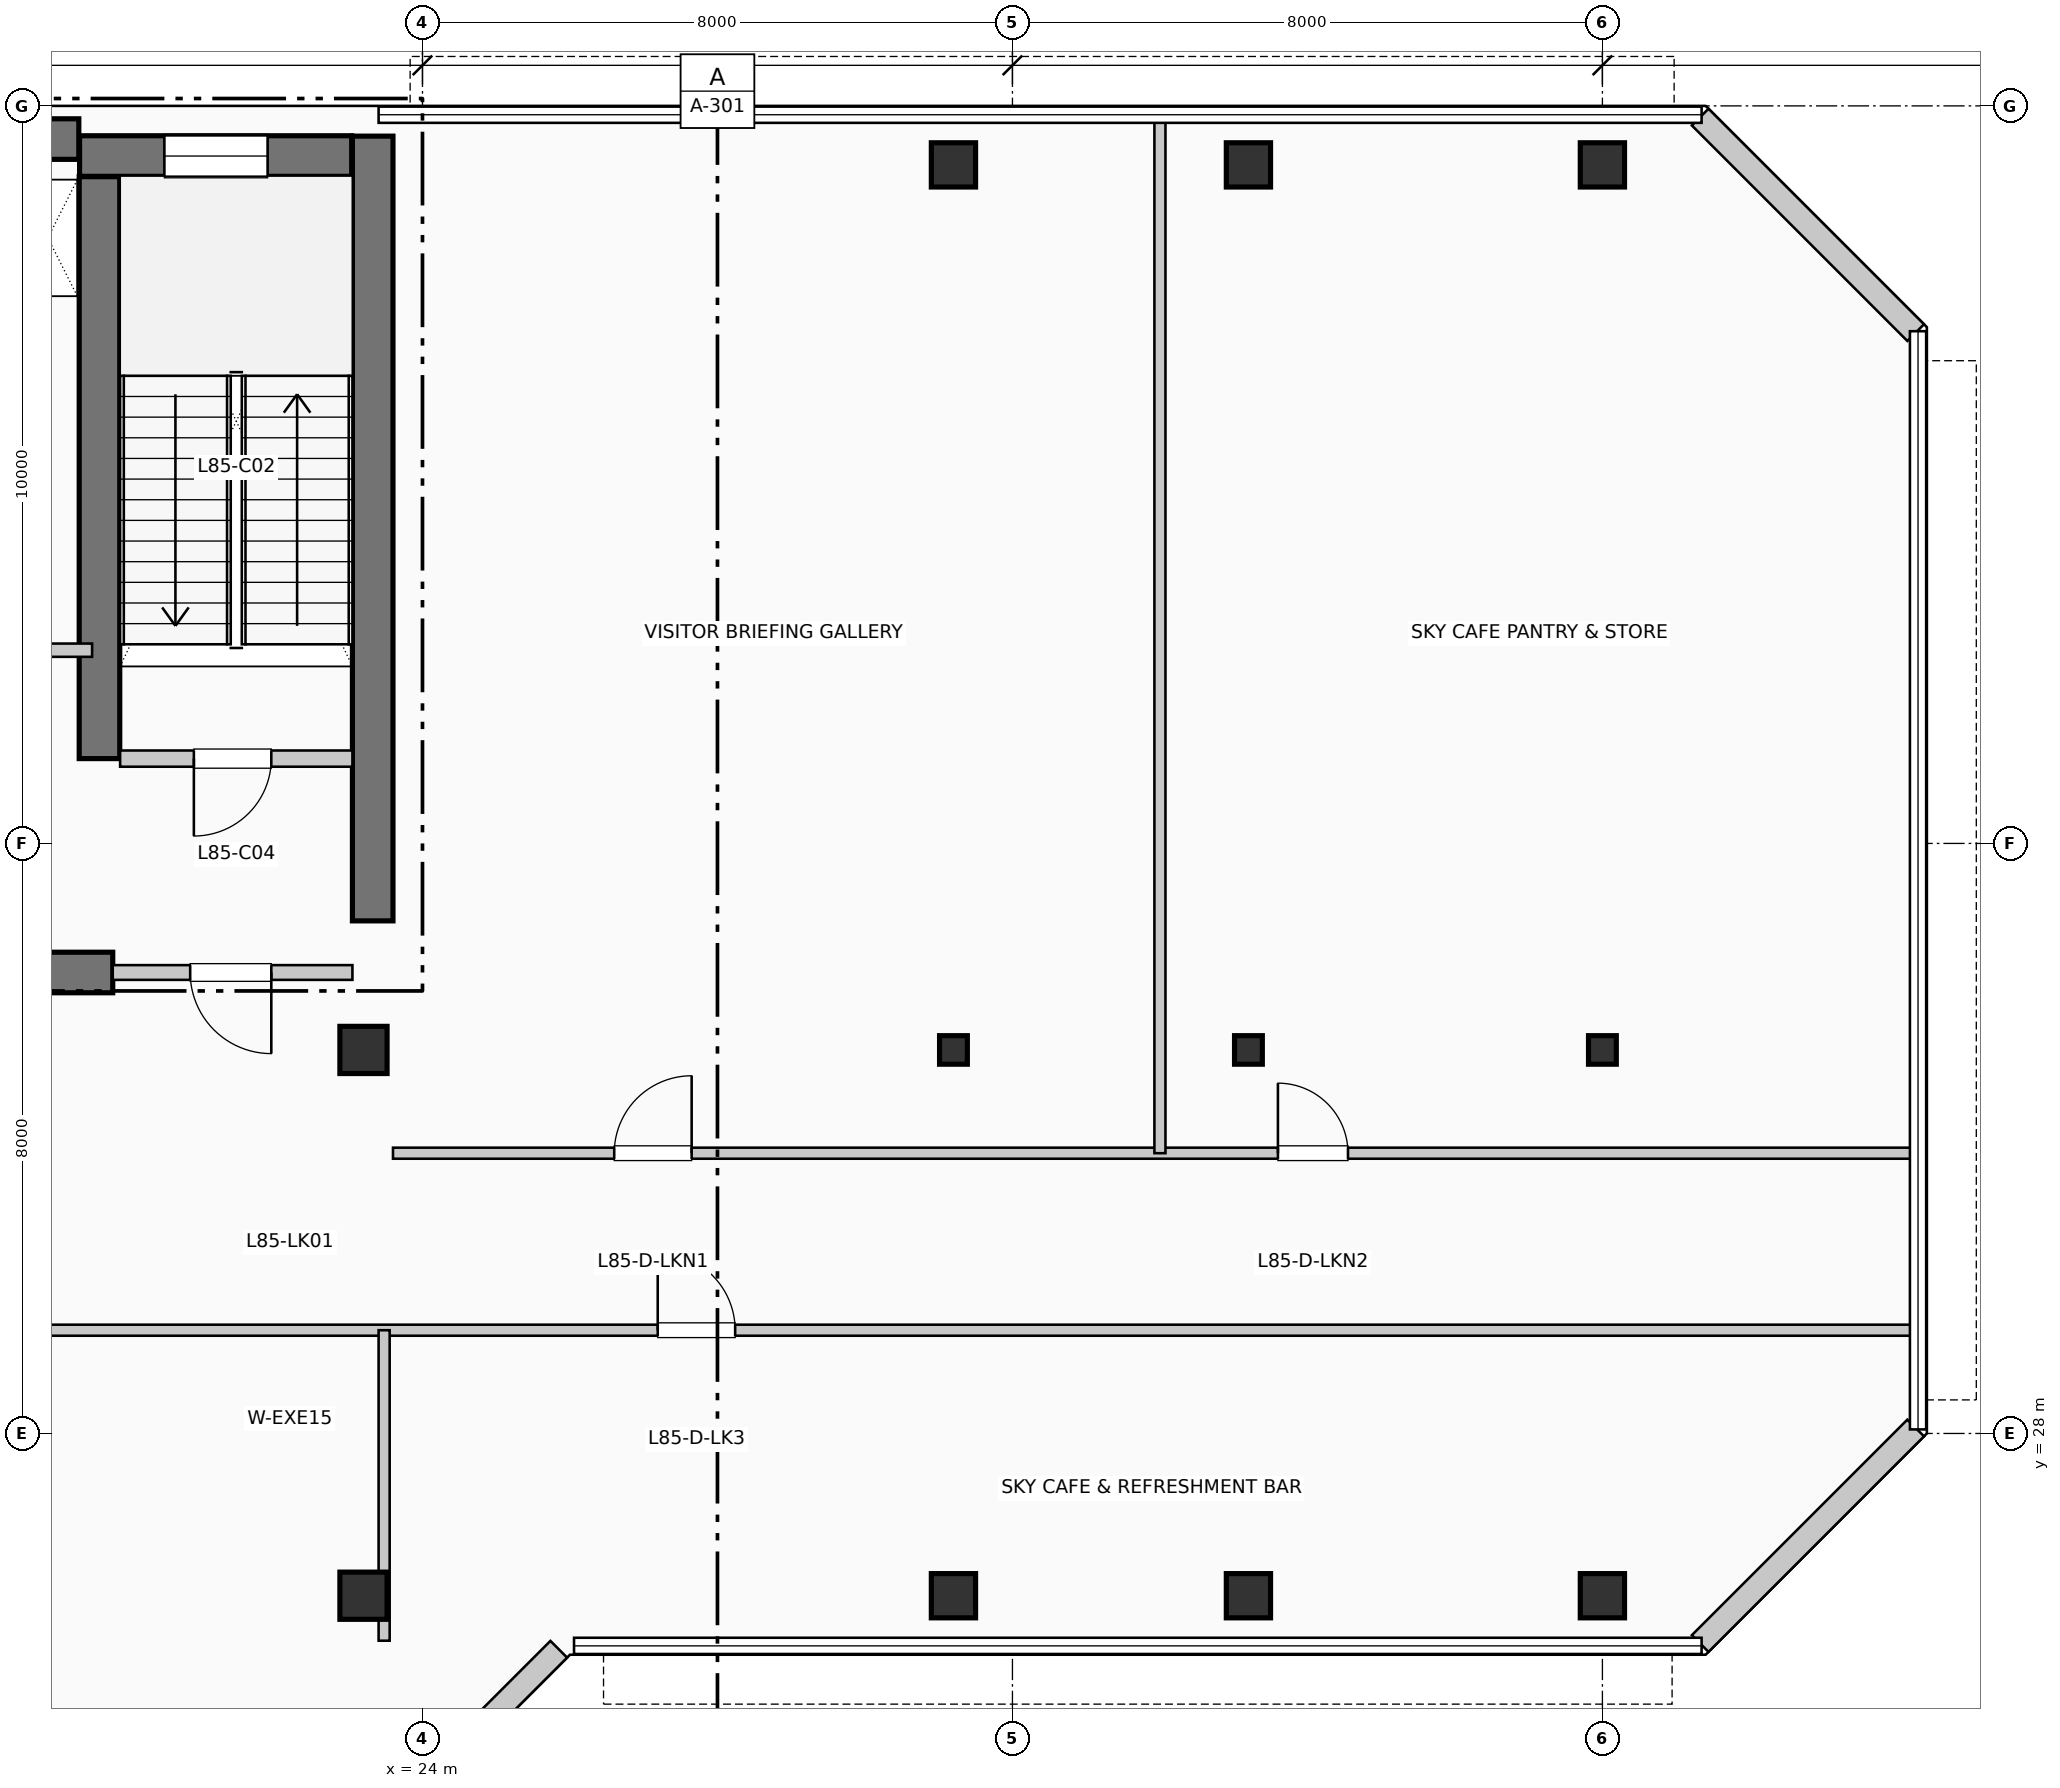
"""IFC4 building model, lengths in metres.
Left out: names, types, materials, properties, quantities, classifications, styles, units other than length and angle.
Written with IfcOpenShell. Run it as: python <this file> out.ifc"""

import sys

from ifc_helpers import new_model, si_unit, direction, frame, frame_2d, origin, origin_2d, place, context, subcontext, project, spatial, rectangle, i_section, extrude, element, fill, save


model = new_model("IFC4")
c1 = context("Model", 3, precision=1e-05, world=origin(), true_north=direction((0.0, 1.0)))
c2 = subcontext(c1, "Body", "Model", "MODEL_VIEW")
j1 = project(units=[si_unit("LENGTHUNIT", "METRE"), si_unit("PLANEANGLEUNIT", "RADIAN")], contexts=[c1])
p1 = place(None, origin())
s1 = spatial("IfcSite", under=j1, at=p1, CompositionType="ELEMENT")
p2 = place(p1, origin())
s2 = spatial("IfcBuilding", under=s1, at=p2, CompositionType="ELEMENT")
p3 = place(p2, frame((0.0, 0.0, 347.49)))
s3 = spatial("IfcBuildingStorey", under=s2, at=p3, CompositionType="ELEMENT", Elevation=347.49)
p4 = place(p3, frame((5.36, 45.55, 0.0), z_axis=(0.0, 0.0, 1.0), x_axis=(1.0, 0.0, 0.0)))
e1 = element("IfcWall", 1, at=p4, inside=s3, PredefinedType="SHEAR", context=c2, shape_type="SweptSolid", body=[
    extrude(rectangle(XDim=13.98, YDim=0.55, at=frame_2d((6.99, 0.0))), origin(), (0.0, 0.0, 1.0), 4.62),
])
p5 = place(p3, frame((23.325, 34.95, 0.0), z_axis=(0.0, 0.0, 1.0), x_axis=(0.0, 1.0, 0.0)))
e2 = element("IfcWall", 2, at=p5, inside=s3, PredefinedType="SHEAR", context=c2, shape_type="SweptSolid", body=[
    extrude(rectangle(XDim=10.64, YDim=0.55, at=frame_2d((5.32, 0.0))), origin(), (0.0, 0.0, 1.0), 4.62),
])
p6 = place(p3, frame((13.68, 34.25, 0.0), z_axis=(0.0, 0.0, 1.0), x_axis=(1.0, 0.0, 0.0)))
e3 = element("IfcWall", 3, at=p6, inside=s3, PredefinedType="SHEAR", context=c2, shape_type="SweptSolid", body=[
    extrude(rectangle(XDim=6.12, YDim=0.55, at=frame_2d((3.06, 0.0))), origin(), (0.0, 0.0, 1.0), 4.62),
])
p7 = place(p3, frame((19.62, 37.15, 0.0), z_axis=(0.0, 0.0, 1.0), x_axis=(0.0, 1.0, 0.0)))
e4 = element("IfcWall", 4, at=p7, inside=s3, PredefinedType="SHEAR", context=c2, shape_type="SweptSolid", body=[
    extrude(rectangle(XDim=7.89, YDim=0.55, at=frame_2d((3.945, 0.0))), origin(), (0.0, 0.0, 1.0), 4.62),
])
p8 = place(p3, frame((19.35, 45.32, 0.0), z_axis=(0.0, 0.0, 1.0), x_axis=(1.0, 0.0, 0.0)))
e5 = element("IfcWall", 5, at=p8, inside=s3, PredefinedType="SHEAR", context=c2, shape_type="SweptSolid", body=[
    extrude(rectangle(XDim=3.69, YDim=0.55, at=frame_2d((1.845, 0.0))), origin(), (0.0, 0.0, 1.0), 4.62),
])
p9 = place(p8, frame((1.15, 0.0, 1.05)))
e6 = element("IfcOpeningElement", 6, at=p9, cuts=e5, PredefinedType="OPENING", context=c2, shape_type="SweptSolid", body=[
    extrude(rectangle(XDim=1.4, YDim=1.8, at=frame_2d((0.7, 0.9))), frame((0.0, 0.285, 0.0), z_axis=(0.0, -1.0, 0.0), x_axis=(1.0, 0.0, 0.0)), (0.0, 0.0, 1.0), 0.57),
])
for number, where, z_axis, x_axis in (
    (7, (23.2, 25.8, 0.0), (0.0, 0.0, 1.0), (1.0, 0.0, 0.0)),
    (8, (23.2, 33.2, 0.0), (0.0, 0.0, 1.0), (1.0, 0.0, 0.0)),
):
    element("IfcColumn", number, at=place(p3, frame(where, z_axis=z_axis, x_axis=x_axis)), inside=s3, PredefinedType="COLUMN", context=c2, shape_type="SweptSolid", body=[
        extrude(rectangle(XDim=0.64, YDim=0.64, at=origin_2d()), origin(), (0.0, 0.0, 1.0), 4.62),
    ])
p10 = place(p3, frame((31.2, 25.8, 0.0), z_axis=(0.0, 0.0, 1.0), x_axis=(1.0, 0.0, 0.0)))
e9 = element("IfcColumn", 9, at=p10, inside=s3, PredefinedType="COLUMN", context=c2, shape_type="SweptSolid", body=[
    extrude(rectangle(XDim=0.6, YDim=0.6, at=origin_2d()), origin(), (0.0, 0.0, 1.0), 4.62),
])
p11 = place(p3, frame((31.2, 33.2, 0.0), z_axis=(0.0, 0.0, 1.0), x_axis=(1.0, 0.0, 0.0)))
e10 = element("IfcColumn", 10, at=p11, inside=s3, PredefinedType="COLUMN", context=c2, shape_type="SweptSolid", body=[
    extrude(i_section(OverallWidth=0.377, OverallDepth=0.387, WebThickness=0.016, FlangeThickness=0.027, at=origin_2d()), origin(), (0.0, 0.0, 1.0), 4.62),
])
for number, where, z_axis, x_axis in (
    (11, (31.2, 45.2, 0.0), (0.0, 0.0, 1.0), (1.0, 0.0, 0.0)),
    (12, (35.2, 25.8, 0.0), (0.0, 0.0, 1.0), (1.0, 0.0, 0.0)),
):
    element("IfcColumn", number, at=place(p3, frame(where, z_axis=z_axis, x_axis=x_axis)), inside=s3, PredefinedType="COLUMN", context=c2, shape_type="SweptSolid", body=[
        extrude(rectangle(XDim=0.6, YDim=0.6, at=origin_2d()), origin(), (0.0, 0.0, 1.0), 4.62),
    ])
p12 = place(p3, frame((35.2, 33.2, 0.0), z_axis=(0.0, 0.0, 1.0), x_axis=(1.0, 0.0, 0.0)))
e13 = element("IfcColumn", 13, at=p12, inside=s3, PredefinedType="COLUMN", context=c2, shape_type="SweptSolid", body=[
    extrude(i_section(OverallWidth=0.377, OverallDepth=0.387, WebThickness=0.016, FlangeThickness=0.027, at=origin_2d()), origin(), (0.0, 0.0, 1.0), 4.62),
])
for number, where, z_axis, x_axis in (
    (14, (35.2, 45.2, 0.0), (0.0, 0.0, 1.0), (1.0, 0.0, 0.0)),
    (15, (40.0, 25.8, 0.0), (0.0, 0.0, 1.0), (1.0, 0.0, 0.0)),
):
    element("IfcColumn", number, at=place(p3, frame(where, z_axis=z_axis, x_axis=x_axis)), inside=s3, PredefinedType="COLUMN", context=c2, shape_type="SweptSolid", body=[
        extrude(rectangle(XDim=0.6, YDim=0.6, at=origin_2d()), origin(), (0.0, 0.0, 1.0), 4.62),
    ])
p13 = place(p3, frame((40.0, 33.2, 0.0), z_axis=(0.0, 0.0, 1.0), x_axis=(1.0, 0.0, 0.0)))
e16 = element("IfcColumn", 16, at=p13, inside=s3, PredefinedType="COLUMN", context=c2, shape_type="SweptSolid", body=[
    extrude(i_section(OverallWidth=0.377, OverallDepth=0.387, WebThickness=0.016, FlangeThickness=0.027, at=origin_2d()), origin(), (0.0, 0.0, 1.0), 4.62),
])
p14 = place(p3, frame((40.0, 45.2, 0.0), z_axis=(0.0, 0.0, 1.0), x_axis=(1.0, 0.0, 0.0)))
e17 = element("IfcColumn", 17, at=p14, inside=s3, PredefinedType="COLUMN", context=c2, shape_type="SweptSolid", body=[
    extrude(rectangle(XDim=0.6, YDim=0.6, at=origin_2d()), origin(), (0.0, 0.0, 1.0), 4.62),
])
p15 = place(p3, frame((23.926, 23.152, 0.0), z_axis=(0.0, 0.0, 1.0), x_axis=(0.707106781187, 0.707106781187, 0.0)))
e18 = element("IfcWall", 18, at=p15, inside=s3, PredefinedType="SOLIDWALL", context=c2, shape_type="SweptSolid", body=[
    extrude(rectangle(XDim=2.718, YDim=0.32, at=frame_2d((1.359, 0.0))), origin(), (0.0, 0.0, 1.0), 4.37),
])
for number, where, z_axis, x_axis in (
    (19, (41.326, 25.152, 0.0), (0.0, 0.0, 1.0), (0.707, 0.707, 0.0)),
    (20, (44.248, 42.926, 0.0), (0.0, 0.0, 1.0), (-0.707, 0.707, 0.0)),
):
    element("IfcWall", number, at=place(p3, frame(where, z_axis=z_axis, x_axis=x_axis)), inside=s3, PredefinedType="SOLIDWALL", context=c2, shape_type="SweptSolid", body=[
        extrude(rectangle(XDim=4.133, YDim=0.32, at=frame_2d((2.066, 0.0))), origin(), (0.0, 0.0, 1.0), 4.37),
    ])
p16 = place(p3, frame((19.9, 37.15, 0.0), z_axis=(0.0, 0.0, 1.0), x_axis=(1.0, 0.0, 0.0)))
e21 = element("IfcWall", 21, at=p16, inside=s3, PredefinedType="PARTITIONING", context=c2, shape_type="SweptSolid", body=[
    extrude(rectangle(XDim=3.15, YDim=0.22, at=frame_2d((1.575, 0.0))), origin(), (0.0, 0.0, 1.0), 4.37),
])
p17 = place(p16, frame((2.05, 0.0, 0.0), z_axis=(0.0, 0.0, 1.0), x_axis=(-1.0, 0.0, 0.0)))
e22 = element("IfcOpeningElement", 22, at=p17, cuts=e21, PredefinedType="OPENING", context=c2, shape_type="SweptSolid", body=[
    extrude(rectangle(XDim=1.05, YDim=2.15, at=frame_2d((0.525, 1.075))), frame((0.0, 0.12, 0.0), z_axis=(0.0, -1.0, 0.0), x_axis=(1.0, 0.0, 0.0)), (0.0, 0.0, 1.0), 0.24),
])
p18 = place(p3, frame((19.8, 34.25, 0.0), z_axis=(0.0, 0.0, 1.0), x_axis=(1.0, 0.0, 0.0)))
e23 = element("IfcWall", 23, at=p18, inside=s3, PredefinedType="PARTITIONING", context=c2, shape_type="SweptSolid", body=[
    extrude(rectangle(XDim=3.25, YDim=0.2, at=frame_2d((1.625, 0.0))), origin(), (0.0, 0.0, 1.0), 4.37),
])
p19 = place(p18, frame((2.15, 0.0, 0.0), z_axis=(0.0, 0.0, 1.0), x_axis=(-1.0, 0.0, 0.0)))
e24 = element("IfcOpeningElement", 24, at=p19, cuts=e23, PredefinedType="OPENING", context=c2, shape_type="SweptSolid", body=[
    extrude(rectangle(XDim=1.1, YDim=2.15, at=frame_2d((0.55, 1.075))), frame((0.0, 0.11, 0.0), z_axis=(0.0, -1.0, 0.0), x_axis=(1.0, 0.0, 0.0)), (0.0, 0.0, 1.0), 0.22),
])
p20 = place(p3, frame((17.68, 38.62, 0.0), z_axis=(0.0, 0.0, 1.0), x_axis=(1.0, 0.0, 0.0)))
e25 = element("IfcWall", 25, at=p20, inside=s3, PredefinedType="PARTITIONING", context=c2, shape_type="SweptSolid", body=[
    extrude(rectangle(XDim=1.84, YDim=0.18, at=frame_2d((0.92, 0.0))), origin(), (0.0, 0.0, 1.0), 4.37),
])
p21 = place(p20, frame((0.24, 0.0, 0.0)))
e26 = element("IfcOpeningElement", 26, at=p21, cuts=e25, PredefinedType="OPENING", context=c2, shape_type="SweptSolid", body=[
    extrude(rectangle(XDim=0.92, YDim=2.1, at=frame_2d((0.46, 1.05))), frame((0.0, 0.1, 0.0), z_axis=(0.0, -1.0, 0.0), x_axis=(1.0, 0.0, 0.0)), (0.0, 0.0, 1.0), 0.2),
])
p22 = place(p3, frame((0.19, 29.4, 0.0), z_axis=(0.0, 0.0, 1.0), x_axis=(1.0, 0.0, 0.0)))
e27 = element("IfcWall", 27, at=p22, inside=s3, PredefinedType="PARTITIONING", context=c2, shape_type="SweptSolid", body=[
    extrude(rectangle(XDim=44.02, YDim=0.15, at=frame_2d((22.01, 0.0))), origin(), (0.0, 0.0, 1.0), 4.055),
])
p23 = place(p22, frame((4.0, 0.0, 0.0)))
e28 = element("IfcOpeningElement", 28, at=p23, cuts=e27, PredefinedType="OPENING", context=c2, shape_type="SweptSolid", body=[
    extrude(rectangle(XDim=1.8, YDim=2.3, at=frame_2d((0.9, 1.15))), frame((0.0, 0.085, 0.0), z_axis=(0.0, -1.0, 0.0), x_axis=(1.0, 0.0, 0.0)), (0.0, 0.0, 1.0), 0.17),
])
p24 = place(p22, frame((15.0, 0.0, 0.0)))
e29 = element("IfcOpeningElement", 29, at=p24, cuts=e27, PredefinedType="OPENING", context=c2, shape_type="SweptSolid", body=[
    extrude(rectangle(XDim=1.8, YDim=2.3, at=frame_2d((0.9, 1.15))), frame((0.0, 0.085, 0.0), z_axis=(0.0, -1.0, 0.0), x_axis=(1.0, 0.0, 0.0)), (0.0, 0.0, 1.0), 0.17),
])
p25 = place(p22, frame((27.0, 0.0, 0.0)))
e30 = element("IfcOpeningElement", 30, at=p25, cuts=e27, PredefinedType="OPENING", context=c2, shape_type="SweptSolid", body=[
    extrude(rectangle(XDim=1.05, YDim=2.15, at=frame_2d((0.525, 1.075))), frame((0.0, 0.085, 0.0), z_axis=(0.0, -1.0, 0.0), x_axis=(1.0, 0.0, 0.0)), (0.0, 0.0, 1.0), 0.17),
])
p26 = place(p3, frame((23.6, 31.8, 0.0), z_axis=(0.0, 0.0, 1.0), x_axis=(1.0, 0.0, 0.0)))
e31 = element("IfcWall", 31, at=p26, inside=s3, PredefinedType="PARTITIONING", context=c2, shape_type="SweptSolid", body=[
    extrude(rectangle(XDim=20.61, YDim=0.15, at=frame_2d((10.305, 0.0))), origin(), (0.0, 0.0, 1.0), 4.37),
])
p27 = place(p26, frame((3.0, 0.0, 0.0)))
e32 = element("IfcOpeningElement", 32, at=p27, cuts=e31, PredefinedType="OPENING", context=c2, shape_type="SweptSolid", body=[
    extrude(rectangle(XDim=1.05, YDim=2.15, at=frame_2d((0.525, 1.075))), frame((0.0, 0.085, 0.0), z_axis=(0.0, -1.0, 0.0), x_axis=(1.0, 0.0, 0.0)), (0.0, 0.0, 1.0), 0.17),
])
p28 = place(p26, frame((12.0, 0.0, 0.0)))
e33 = element("IfcOpeningElement", 33, at=p28, cuts=e31, PredefinedType="OPENING", context=c2, shape_type="SweptSolid", body=[
    extrude(rectangle(XDim=0.95, YDim=2.15, at=frame_2d((0.475, 1.075))), frame((0.0, 0.085, 0.0), z_axis=(0.0, -1.0, 0.0), x_axis=(1.0, 0.0, 0.0)), (0.0, 0.0, 1.0), 0.17),
])
p29 = place(p3, frame((23.48, 25.19, 0.0), z_axis=(0.0, 0.0, 1.0), x_axis=(0.0, 1.0, 0.0)))
e34 = element("IfcWall", 34, at=p29, inside=s3, PredefinedType="PARTITIONING", context=c2, shape_type="SweptSolid", body=[
    extrude(rectangle(XDim=4.21, YDim=0.15, at=frame_2d((2.105, 0.0))), origin(), (0.0, 0.0, 1.0), 3.855),
])
p30 = place(p3, frame((34.0, 31.8, 0.0), z_axis=(0.0, 0.0, 1.0), x_axis=(0.0, 1.0, 0.0)))
e35 = element("IfcWall", 35, at=p30, inside=s3, PredefinedType="PARTITIONING", context=c2, shape_type="SweptSolid", body=[
    extrude(rectangle(XDim=14.01, YDim=0.15, at=frame_2d((7.005, 0.0))), origin(), (0.0, 0.0, 1.0), 4.37),
])
p31 = place(p9, origin())
e36 = element("IfcWindow", 36, at=p31, inside=s3, PartitioningType="SINGLE_PANEL", PredefinedType="WINDOW", context=c2, shape_type="SweptSolid", body=[
    extrude(rectangle(XDim=1.4, YDim=1.8, at=frame_2d((0.7, 0.9))), frame((0.0, 0.03, 0.0), z_axis=(0.0, -1.0, 0.0), x_axis=(1.0, 0.0, 0.0)), (0.0, 0.0, 1.0), 0.06),
])
fill(e6, e36)
p32 = place(p17, origin())
e37 = element("IfcDoor", 37, at=p32, inside=s3, OperationType="SINGLE_SWING_LEFT", PredefinedType="DOOR", context=c2, shape_type="SweptSolid", body=[
    extrude(rectangle(XDim=1.05, YDim=2.15, at=frame_2d((0.525, 1.075))), frame((0.0, 0.025, 0.0), z_axis=(0.0, -1.0, 0.0), x_axis=(1.0, 0.0, 0.0)), (0.0, 0.0, 1.0), 0.05),
])
fill(e22, e37)
p33 = place(p19, origin())
e38 = element("IfcDoor", 38, at=p33, inside=s3, OperationType="SINGLE_SWING_RIGHT", PredefinedType="DOOR", context=c2, shape_type="SweptSolid", body=[
    extrude(rectangle(XDim=1.1, YDim=2.15, at=frame_2d((0.55, 1.075))), frame((0.0, 0.025, 0.0), z_axis=(0.0, -1.0, 0.0), x_axis=(1.0, 0.0, 0.0)), (0.0, 0.0, 1.0), 0.05),
])
fill(e24, e38)
p34 = place(p25, origin())
e39 = element("IfcDoor", 39, at=p34, inside=s3, OperationType="SINGLE_SWING_LEFT", PredefinedType="DOOR", context=c2, shape_type="SweptSolid", body=[
    extrude(rectangle(XDim=1.05, YDim=2.15, at=frame_2d((0.525, 1.075))), frame((0.0, 0.025, 0.0), z_axis=(0.0, -1.0, 0.0), x_axis=(1.0, 0.0, 0.0)), (0.0, 0.0, 1.0), 0.05),
])
fill(e30, e39)
p35 = place(p27, origin())
e40 = element("IfcDoor", 40, at=p35, inside=s3, OperationType="SINGLE_SWING_RIGHT", PredefinedType="DOOR", context=c2, shape_type="SweptSolid", body=[
    extrude(rectangle(XDim=1.05, YDim=2.15, at=frame_2d((0.525, 1.075))), frame((0.0, 0.025, 0.0), z_axis=(0.0, -1.0, 0.0), x_axis=(1.0, 0.0, 0.0)), (0.0, 0.0, 1.0), 0.05),
])
fill(e32, e40)
p36 = place(p28, origin())
e41 = element("IfcDoor", 41, at=p36, inside=s3, OperationType="SINGLE_SWING_LEFT", PredefinedType="DOOR", context=c2, shape_type="SweptSolid", body=[
    extrude(rectangle(XDim=0.95, YDim=2.15, at=frame_2d((0.475, 1.075))), frame((0.0, 0.025, 0.0), z_axis=(0.0, -1.0, 0.0), x_axis=(1.0, 0.0, 0.0)), (0.0, 0.0, 1.0), 0.05),
])
fill(e33, e41)
save(model, sys.argv[1])
